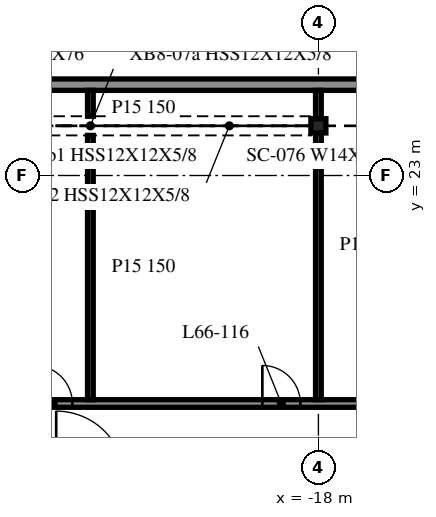
"""IFC4 building model, lengths in metres.
Left out: names, types, materials, properties, quantities, classifications, styles, units other than length and angle.
Written with IfcOpenShell. Run it as: python <this file> out.ifc"""

import sys

from ifc_helpers import new_model, si_unit, direction, frame, frame_2d, origin, origin_2d, place, context, subcontext, project, spatial, rectangle, i_section, extrude, element, fill, save


model = new_model("IFC4")
c1 = context("Model", 3, precision=1e-05, world=origin(), true_north=direction((0.0, 1.0)))
c2 = subcontext(c1, "Body", "Model", "MODEL_VIEW")
j1 = project(units=[si_unit("LENGTHUNIT", "METRE"), si_unit("PLANEANGLEUNIT", "RADIAN")], contexts=[c1])
p1 = place(None, origin())
s1 = spatial("IfcSite", under=j1, at=p1, CompositionType="ELEMENT")
p2 = place(p1, origin())
s2 = spatial("IfcBuilding", under=s1, at=p2, CompositionType="ELEMENT")
p3 = place(p2, frame((0.0, 0.0, 270.9)))
s3 = spatial("IfcBuildingStorey", under=s2, at=p3, CompositionType="ELEMENT", Elevation=270.9)
p4 = place(p3, frame((-18.0, 24.307, -0.34), z_axis=(0.0, 0.0, 1.0), x_axis=(1.0, 0.0, 0.0)))
e1 = element("IfcColumn", 1, at=p4, inside=s3, PredefinedType="COLUMN", context=c2, shape_type="SweptSolid", body=[
    extrude(i_section(OverallWidth=0.394, OverallDepth=0.376, WebThickness=0.017, FlangeThickness=0.028, at=origin_2d()), origin(), (0.0, 0.0, 1.0), 3.8),
])
p5 = place(p3, frame((42.0, 25.39, 0.0), z_axis=(0.0, 0.0, 1.0), x_axis=(-1.0, 0.0, 0.0)))
e2 = element("IfcWall", 2, at=p5, inside=s3, PredefinedType="NOTDEFINED", context=c2, shape_type="SweptSolid", body=[
    extrude(rectangle(XDim=84.0, YDim=0.3, at=frame_2d((42.0, 0.0))), origin(), (0.0, 0.0, 1.0), 2.853),
])
p6 = place(p3, frame((-47.975, 17.0, 0.0), z_axis=(0.0, 0.0, 1.0), x_axis=(1.0, 0.0, 0.0)))
e3 = element("IfcWall", 3, at=p6, inside=s3, PredefinedType="PARTITIONING", context=c2, shape_type="SweptSolid", body=[
    extrude(rectangle(XDim=95.95, YDim=0.2, at=frame_2d((47.975, 0.0))), origin(), (0.0, 0.0, 1.0), 3.46),
])
p7 = place(p6, frame((10.7, 0.0, 0.0)))
e4 = element("IfcOpeningElement", 4, at=p7, cuts=e3, PredefinedType="OPENING", context=c2, shape_type="SweptSolid", body=[
    extrude(rectangle(XDim=0.9, YDim=2.1, at=frame_2d((0.45, 1.05))), frame((0.0, 0.11, 0.0), z_axis=(0.0, -1.0, 0.0), x_axis=(1.0, 0.0, 0.0)), (0.0, 0.0, 1.0), 0.22),
])
p8 = place(p6, frame((13.7, 0.0, 0.0)))
e5 = element("IfcOpeningElement", 5, at=p8, cuts=e3, PredefinedType="OPENING", context=c2, shape_type="SweptSolid", body=[
    extrude(rectangle(XDim=0.9, YDim=2.1, at=frame_2d((0.45, 1.05))), frame((0.0, 0.11, 0.0), z_axis=(0.0, -1.0, 0.0), x_axis=(1.0, 0.0, 0.0)), (0.0, 0.0, 1.0), 0.22),
])
p9 = place(p6, frame((22.5, 0.0, 0.0)))
e6 = element("IfcOpeningElement", 6, at=p9, cuts=e3, PredefinedType="OPENING", context=c2, shape_type="SweptSolid", body=[
    extrude(rectangle(XDim=1.0, YDim=2.1, at=frame_2d((0.5, 1.05))), frame((0.0, 0.11, 0.0), z_axis=(0.0, -1.0, 0.0), x_axis=(1.0, 0.0, 0.0)), (0.0, 0.0, 1.0), 0.22),
])
p10 = place(p6, frame((28.5, 0.0, 0.0)))
e7 = element("IfcOpeningElement", 7, at=p10, cuts=e3, PredefinedType="OPENING", context=c2, shape_type="SweptSolid", body=[
    extrude(rectangle(XDim=1.0, YDim=2.1, at=frame_2d((0.5, 1.05))), frame((0.0, 0.11, 0.0), z_axis=(0.0, -1.0, 0.0), x_axis=(1.0, 0.0, 0.0)), (0.0, 0.0, 1.0), 0.22),
])
p11 = place(p6, frame((40.7, 0.0, 0.0)))
e8 = element("IfcOpeningElement", 8, at=p11, cuts=e3, PredefinedType="OPENING", context=c2, shape_type="SweptSolid", body=[
    extrude(rectangle(XDim=0.9, YDim=2.1, at=frame_2d((0.45, 1.05))), frame((0.0, 0.11, 0.0), z_axis=(0.0, -1.0, 0.0), x_axis=(1.0, 0.0, 0.0)), (0.0, 0.0, 1.0), 0.22),
])
p12 = place(p6, frame((43.5, 0.0, 0.0)))
e9 = element("IfcOpeningElement", 9, at=p12, cuts=e3, PredefinedType="OPENING", context=c2, shape_type="SweptSolid", body=[
    extrude(rectangle(XDim=1.0, YDim=2.1, at=frame_2d((0.5, 1.05))), frame((0.0, 0.11, 0.0), z_axis=(0.0, -1.0, 0.0), x_axis=(1.0, 0.0, 0.0)), (0.0, 0.0, 1.0), 0.22),
])
p13 = place(p6, frame((47.3, 0.0, 0.0)))
e10 = element("IfcOpeningElement", 10, at=p13, cuts=e3, PredefinedType="OPENING", context=c2, shape_type="SweptSolid", body=[
    extrude(rectangle(XDim=0.9, YDim=2.1, at=frame_2d((0.45, 1.05))), frame((0.0, 0.11, 0.0), z_axis=(0.0, -1.0, 0.0), x_axis=(1.0, 0.0, 0.0)), (0.0, 0.0, 1.0), 0.22),
])
p14 = place(p6, frame((54.1, 0.0, 0.0)))
e11 = element("IfcOpeningElement", 11, at=p14, cuts=e3, PredefinedType="OPENING", context=c2, shape_type="SweptSolid", body=[
    extrude(rectangle(XDim=0.9, YDim=2.1, at=frame_2d((0.45, 1.05))), frame((0.0, 0.11, 0.0), z_axis=(0.0, -1.0, 0.0), x_axis=(1.0, 0.0, 0.0)), (0.0, 0.0, 1.0), 0.22),
])
p15 = place(p6, frame((60.1, 0.0, 0.0)))
e12 = element("IfcOpeningElement", 12, at=p15, cuts=e3, PredefinedType="OPENING", context=c2, shape_type="SweptSolid", body=[
    extrude(rectangle(XDim=1.0, YDim=2.1, at=frame_2d((0.5, 1.05))), frame((0.0, 0.11, 0.0), z_axis=(0.0, -1.0, 0.0), x_axis=(1.0, 0.0, 0.0)), (0.0, 0.0, 1.0), 0.22),
])
p16 = place(p6, frame((72.1, 0.0, 0.0)))
e13 = element("IfcOpeningElement", 13, at=p16, cuts=e3, PredefinedType="OPENING", context=c2, shape_type="SweptSolid", body=[
    extrude(rectangle(XDim=1.0, YDim=2.1, at=frame_2d((0.5, 1.05))), frame((0.0, 0.11, 0.0), z_axis=(0.0, -1.0, 0.0), x_axis=(1.0, 0.0, 0.0)), (0.0, 0.0, 1.0), 0.22),
])
p17 = place(p6, frame((75.1, 0.0, 0.0)))
e14 = element("IfcOpeningElement", 14, at=p17, cuts=e3, PredefinedType="OPENING", context=c2, shape_type="SweptSolid", body=[
    extrude(rectangle(XDim=0.9, YDim=2.1, at=frame_2d((0.45, 1.05))), frame((0.0, 0.11, 0.0), z_axis=(0.0, -1.0, 0.0), x_axis=(1.0, 0.0, 0.0)), (0.0, 0.0, 1.0), 0.22),
])
p18 = place(p6, frame((84.1, 0.0, 0.0)))
e15 = element("IfcOpeningElement", 15, at=p18, cuts=e3, PredefinedType="OPENING", context=c2, shape_type="SweptSolid", body=[
    extrude(rectangle(XDim=1.0, YDim=2.1, at=frame_2d((0.5, 1.05))), frame((0.0, 0.11, 0.0), z_axis=(0.0, -1.0, 0.0), x_axis=(1.0, 0.0, 0.0)), (0.0, 0.0, 1.0), 0.22),
])
p19 = place(p6, frame((90.1, 0.0, 0.0)))
e16 = element("IfcOpeningElement", 16, at=p19, cuts=e3, PredefinedType="OPENING", context=c2, shape_type="SweptSolid", body=[
    extrude(rectangle(XDim=0.9, YDim=2.1, at=frame_2d((0.45, 1.05))), frame((0.0, 0.11, 0.0), z_axis=(0.0, -1.0, 0.0), x_axis=(1.0, 0.0, 0.0)), (0.0, 0.0, 1.0), 0.22),
])
p20 = place(p3, frame((-24.0, 17.1, 0.0), z_axis=(0.0, 0.0, 1.0), x_axis=(0.0, 1.0, 0.0)))
e17 = element("IfcWall", 17, at=p20, inside=s3, PredefinedType="PARTITIONING", context=c2, shape_type="SweptSolid", body=[
    extrude(rectangle(XDim=6.955, YDim=0.15, at=frame_2d((3.477, 0.0))), origin(), (0.0, 0.0, 1.0), 3.46),
])
p21 = place(p3, frame((-24.0, 24.559, 0.0), z_axis=(0.0, 0.0, 1.0), x_axis=(0.0, 1.0, 0.0)))
e18 = element("IfcWall", 18, at=p21, inside=s3, PredefinedType="PARTITIONING", context=c2, shape_type="SweptSolid", body=[
    extrude(rectangle(XDim=0.681, YDim=0.15, at=frame_2d((0.34, 0.0))), origin(), (0.0, 0.0, 1.0), 3.46),
])
p22 = place(p3, frame((-18.0, 17.1, 0.0), z_axis=(0.0, 0.0, 1.0), x_axis=(0.0, 1.0, 0.0)))
e19 = element("IfcWall", 19, at=p22, inside=s3, PredefinedType="PARTITIONING", context=c2, shape_type="SweptSolid", body=[
    extrude(rectangle(XDim=8.14, YDim=0.15, at=frame_2d((4.07, 0.0))), origin(), (0.0, 0.0, 1.0), 3.46),
])
p23 = place(p9, origin())
e20 = element("IfcDoor", 20, at=p23, inside=s3, OperationType="SINGLE_SWING_LEFT", PredefinedType="DOOR", context=c2, shape_type="SweptSolid", body=[
    extrude(rectangle(XDim=1.0, YDim=2.1, at=frame_2d((0.5, 1.05))), frame((0.0, 0.025, 0.0), z_axis=(0.0, -1.0, 0.0), x_axis=(1.0, 0.0, 0.0)), (0.0, 0.0, 1.0), 0.05),
])
fill(e6, e20)
p24 = place(p10, origin())
e21 = element("IfcDoor", 21, at=p24, inside=s3, OperationType="SINGLE_SWING_LEFT", PredefinedType="DOOR", context=c2, shape_type="SweptSolid", body=[
    extrude(rectangle(XDim=1.0, YDim=2.1, at=frame_2d((0.5, 1.05))), frame((0.0, 0.025, 0.0), z_axis=(0.0, -1.0, 0.0), x_axis=(1.0, 0.0, 0.0)), (0.0, 0.0, 1.0), 0.05),
])
fill(e7, e21)
save(model, sys.argv[1])
